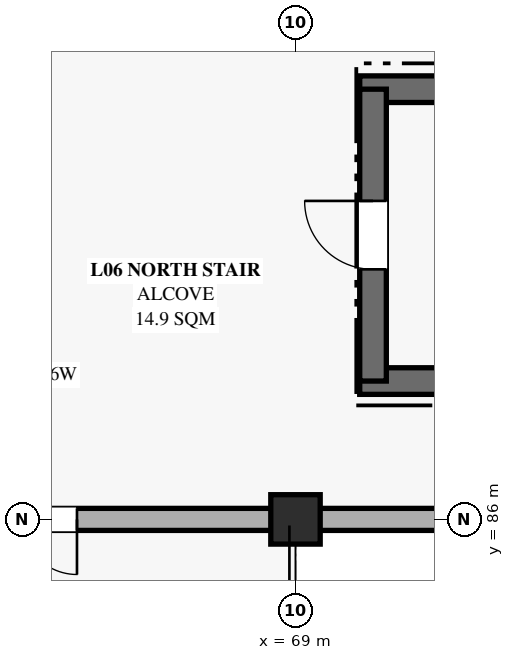
"""IFC4 building model, lengths in metres.
Left out: names, types, materials, properties, quantities, classifications, styles, units other than length and angle.
Written with IfcOpenShell. Run it as: python <this file> out.ifc"""

import sys

from ifc_helpers import new_model, si_unit, direction, frame, frame_2d, origin, origin_2d, place, context, subcontext, project, spatial, rectangle, extrude, element, fill, save


model = new_model("IFC4")
c1 = context("Model", 3, precision=1e-05, world=origin(), true_north=direction((0.0, 1.0)))
c2 = subcontext(c1, "Body", "Model", "MODEL_VIEW")
j1 = project(units=[si_unit("LENGTHUNIT", "METRE"), si_unit("PLANEANGLEUNIT", "RADIAN")], contexts=[c1])
p1 = place(None, origin())
s1 = spatial("IfcSite", under=j1, at=p1, CompositionType="ELEMENT")
p2 = place(p1, origin())
s2 = spatial("IfcBuilding", under=s1, at=p2, CompositionType="ELEMENT")
p3 = place(p2, frame((0.0, 0.0, 28.8)))
s3 = spatial("IfcBuildingStorey", under=s2, at=p3, CompositionType="ELEMENT", Elevation=28.8)
p4 = place(p3, frame((69.0, 86.0, 0.0), z_axis=(0.0, 0.0, 1.0), x_axis=(1.0, 0.0, 0.0)))
e1 = element("IfcColumn", 1, at=p4, inside=s3, PredefinedType="COLUMN", context=c2, shape_type="SweptSolid", body=[
    extrude(rectangle(XDim=0.65, YDim=0.65, at=origin_2d()), origin(), (0.0, 0.0, 1.0), 4.5),
])
p5 = place(p3, frame((75.89, 86.0, 0.0), z_axis=(0.0, 0.0, 1.0), x_axis=(-1.0, 0.0, 0.0)))
e2 = element("IfcWall", 2, at=p5, inside=s3, PredefinedType="SOLIDWALL", context=c2, shape_type="SweptSolid", body=[
    extrude(rectangle(XDim=6.58, YDim=0.29, at=frame_2d((3.29, 0.0))), origin(), (0.0, 0.0, 1.0), 3.0),
])
p6 = place(p5, frame((2.64, 0.0, 0.85)))
e3 = element("IfcOpeningElement", 3, at=p6, cuts=e2, PredefinedType="OPENING", context=c2, shape_type="SweptSolid", body=[
    extrude(rectangle(XDim=1.3, YDim=1.9, at=frame_2d((0.65, 0.95))), frame((0.0, 0.155, 0.0), z_axis=(0.0, -1.0, 0.0), x_axis=(1.0, 0.0, 0.0)), (0.0, 0.0, 1.0), 0.31),
])
p7 = place(p3, frame((68.69, 86.0, 0.0), z_axis=(0.0, 0.0, 1.0), x_axis=(-1.0, 0.0, 0.0)))
e4 = element("IfcWall", 4, at=p7, inside=s3, PredefinedType="SOLIDWALL", context=c2, shape_type="SweptSolid", body=[
    extrude(rectangle(XDim=6.58, YDim=0.29, at=frame_2d((3.29, 0.0))), origin(), (0.0, 0.0, 1.0), 3.0),
])
p8 = place(p7, frame((2.565, 0.0, 0.0)))
e5 = element("IfcOpeningElement", 5, at=p8, cuts=e4, PredefinedType="OPENING", context=c2, shape_type="SweptSolid", body=[
    extrude(rectangle(XDim=1.45, YDim=2.2, at=frame_2d((0.725, 1.1))), frame((0.0, 0.155, 0.0), z_axis=(0.0, -1.0, 0.0), x_axis=(1.0, 0.0, 0.0)), (0.0, 0.0, 1.0), 0.31),
])
for number, where, z_axis, x_axis in (
    (6, (77.855, 87.82, 0.0), (0.0, 0.0, 1.0), (-1.0, 0.0, 0.0)),
    (7, (69.845, 91.66, 0.0), (0.0, 0.0, 1.0), (1.0, 0.0, 0.0)),
):
    element("IfcWall", number, at=place(p3, frame(where, z_axis=z_axis, x_axis=x_axis)), inside=s3, PredefinedType="SHEAR", context=c2, shape_type="SweptSolid", body=[
        extrude(rectangle(XDim=8.01, YDim=0.35, at=frame_2d((4.005, 0.0))), origin(), (0.0, 0.0, 1.0), 4.23),
    ])
p9 = place(p3, frame((70.02, 87.82, 0.0), z_axis=(0.0, 0.0, 1.0), x_axis=(0.0, 1.0, 0.0)))
e8 = element("IfcWall", 8, at=p9, inside=s3, PredefinedType="SHEAR", context=c2, shape_type="SweptSolid", body=[
    extrude(rectangle(XDim=3.84, YDim=0.35, at=frame_2d((1.92, 0.0))), origin(), (0.0, 0.0, 1.0), 4.23),
])
p10 = place(p9, frame((1.47, 0.0, 0.0)))
e9 = element("IfcOpeningElement", 9, at=p10, cuts=e8, PredefinedType="OPENING", context=c2, shape_type="SweptSolid", body=[
    extrude(rectangle(XDim=0.9, YDim=2.06, at=frame_2d((0.45, 1.03))), frame((0.0, 0.185, 0.0), z_axis=(0.0, -1.0, 0.0), x_axis=(1.0, 0.0, 0.0)), (0.0, 0.0, 1.0), 0.37),
])
p11 = place(p8, origin())
e10 = element("IfcDoor", 10, at=p11, inside=s3, OperationType="DOUBLE_DOOR_SINGLE_SWING", PredefinedType="DOOR", context=c2, shape_type="SweptSolid", body=[
    extrude(rectangle(XDim=1.45, YDim=2.2, at=frame_2d((0.725, 1.1))), frame((0.0, 0.025, 0.0), z_axis=(0.0, -1.0, 0.0), x_axis=(1.0, 0.0, 0.0)), (0.0, 0.0, 1.0), 0.05),
])
fill(e5, e10)
p12 = place(p10, origin())
e11 = element("IfcDoor", 11, at=p12, inside=s3, OperationType="SINGLE_SWING_RIGHT", PredefinedType="DOOR", context=c2, shape_type="SweptSolid", body=[
    extrude(rectangle(XDim=0.9, YDim=2.06, at=frame_2d((0.45, 1.03))), frame((0.0, 0.025, 0.0), z_axis=(0.0, -1.0, 0.0), x_axis=(1.0, 0.0, 0.0)), (0.0, 0.0, 1.0), 0.05),
])
fill(e9, e11)
save(model, sys.argv[1])
